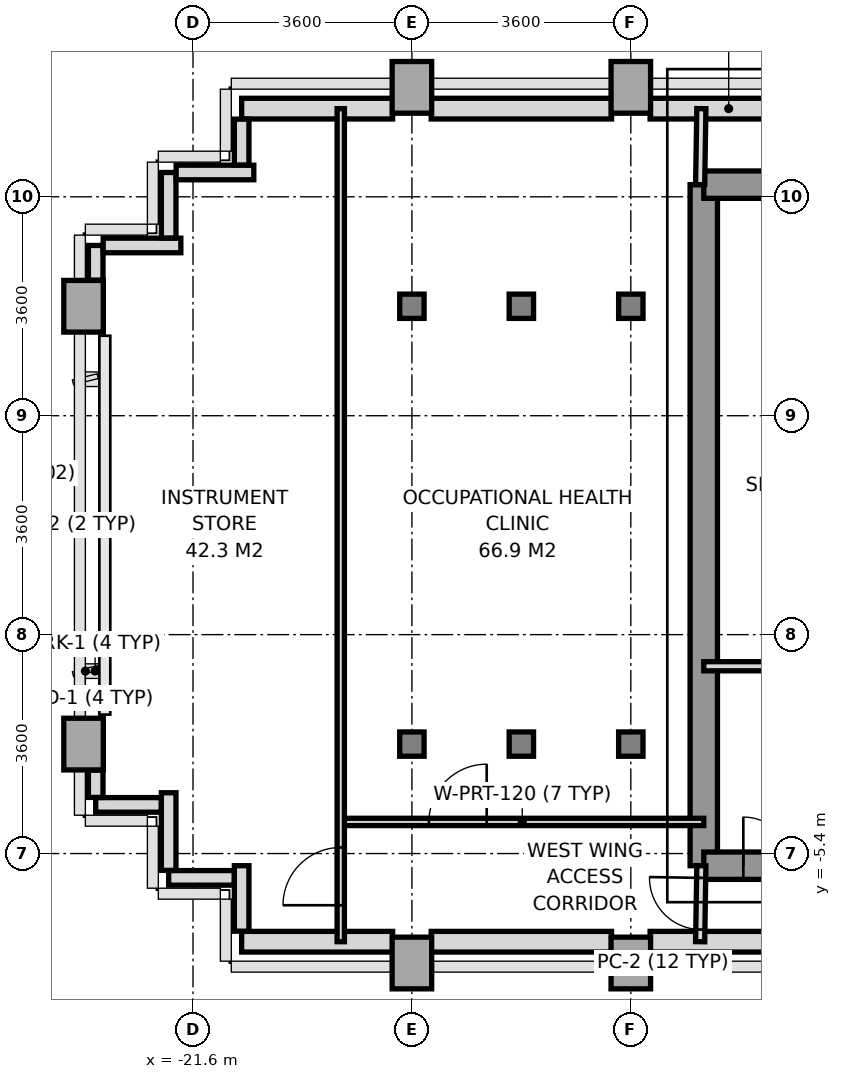
"""IFC4 building model, lengths in metres.
Left out: names, types, materials, properties, quantities, classifications, styles, units other than length and angle.
Written with IfcOpenShell. Run it as: python <this file> out.ifc"""

import sys

from ifc_helpers import new_model, si_unit, direction, frame, frame_2d, origin, origin_2d, place, context, subcontext, project, spatial, rectangle, i_section, extrude, source, transform, mapped, element, fill, save


model = new_model("IFC4")
c1 = context("Model", 3, precision=1e-05, world=origin(), true_north=direction((0.0, 1.0)))
c2 = subcontext(c1, "Body", "Model", "MODEL_VIEW")
j1 = project(units=[si_unit("LENGTHUNIT", "METRE"), si_unit("PLANEANGLEUNIT", "RADIAN")], contexts=[c1])
p1 = place(None, origin())
s1 = spatial("IfcSite", under=j1, at=p1, CompositionType="ELEMENT")
p2 = place(p1, origin())
s2 = spatial("IfcBuilding", under=s1, at=p2, CompositionType="ELEMENT")
p3 = place(p2, frame((0.0, 0.0, 148.2)))
s3 = spatial("IfcBuildingStorey", under=s2, at=p3, CompositionType="ELEMENT", Elevation=148.2)
m1 = source(origin(), c2, "Body", "SweptSolid", [
    extrude(rectangle(XDim=0.65, YDim=0.85, at=origin_2d()), origin(), (0.0, 0.0, 1.0), 3.14),
])
for number, where, z_axis, x_axis in (
    (1, (-23.4, -3.6, 0.0), (0.0, 0.0, 1.0), (1.0, 0.0, 0.0)),
    (2, (-23.4, 3.6, 0.0), (0.0, 0.0, 1.0), (1.0, 0.0, 0.0)),
    (3, (-18.0, -7.2, 0.0), (0.0, 0.0, 1.0), (1.0, 0.0, 0.0)),
):
    element("IfcColumn", number, at=place(p3, frame(where, z_axis=z_axis, x_axis=x_axis)), inside=s3, PredefinedType="COLUMN", context=c2, shape_type="MappedRepresentation", body=[
        mapped(m1, transform((0.0, 0.0, 0.0), x_axis=(1.0, 0.0, 0.0), y_axis=(0.0, 1.0, 0.0), z_axis=(0.0, 0.0, 1.0), scale=1.0)),
    ])
m2 = source(origin(), c2, "Body", "SweptSolid", [
    extrude(i_section(OverallWidth=0.401, OverallDepth=0.399, WebThickness=0.02, FlangeThickness=0.032, at=origin_2d()), origin(), (0.0, 0.0, 1.0), 3.14),
])
for number, where, z_axis, x_axis in (
    (4, (-18.0, -3.6, 0.0), (0.0, 0.0, 1.0), (1.0, 0.0, 0.0)),
    (5, (-18.0, 3.6, 0.0), (0.0, 0.0, 1.0), (1.0, 0.0, 0.0)),
):
    element("IfcColumn", number, at=place(p3, frame(where, z_axis=z_axis, x_axis=x_axis)), inside=s3, PredefinedType="COLUMN", context=c2, shape_type="MappedRepresentation", body=[
        mapped(m2, transform((0.0, 0.0, 0.0), x_axis=(1.0, 0.0, 0.0), y_axis=(0.0, 1.0, 0.0), z_axis=(0.0, 0.0, 1.0), scale=1.0)),
    ])
p4 = place(p3, frame((-18.0, 7.2, 0.0), z_axis=(0.0, 0.0, 1.0), x_axis=(1.0, 0.0, 0.0)))
e6 = element("IfcColumn", 6, at=p4, inside=s3, PredefinedType="COLUMN", context=c2, shape_type="MappedRepresentation", body=[
    mapped(m1, transform((0.0, 0.0, 0.0), x_axis=(1.0, 0.0, 0.0), y_axis=(0.0, 1.0, 0.0), z_axis=(0.0, 0.0, 1.0), scale=1.0)),
])
for number, where, z_axis, x_axis in (
    (7, (-16.2, -3.6, 0.0), (0.0, 0.0, 1.0), (1.0, 0.0, 0.0)),
    (8, (-16.2, 3.6, 0.0), (0.0, 0.0, 1.0), (1.0, 0.0, 0.0)),
):
    element("IfcColumn", number, at=place(p3, frame(where, z_axis=z_axis, x_axis=x_axis)), inside=s3, PredefinedType="COLUMN", context=c2, shape_type="MappedRepresentation", body=[
        mapped(m2, transform((0.0, 0.0, 0.0), x_axis=(1.0, 0.0, 0.0), y_axis=(0.0, 1.0, 0.0), z_axis=(0.0, 0.0, 1.0), scale=1.0)),
    ])
p5 = place(p3, frame((-14.4, -7.2, 0.0), z_axis=(0.0, 0.0, 1.0), x_axis=(1.0, 0.0, 0.0)))
e9 = element("IfcColumn", 9, at=p5, inside=s3, PredefinedType="COLUMN", context=c2, shape_type="MappedRepresentation", body=[
    mapped(m1, transform((0.0, 0.0, 0.0), x_axis=(1.0, 0.0, 0.0), y_axis=(0.0, 1.0, 0.0), z_axis=(0.0, 0.0, 1.0), scale=1.0)),
])
for number, where, z_axis, x_axis in (
    (10, (-14.4, -3.6, 0.0), (0.0, 0.0, 1.0), (1.0, 0.0, 0.0)),
    (11, (-14.4, 3.6, 0.0), (0.0, 0.0, 1.0), (1.0, 0.0, 0.0)),
):
    element("IfcColumn", number, at=place(p3, frame(where, z_axis=z_axis, x_axis=x_axis)), inside=s3, PredefinedType="COLUMN", context=c2, shape_type="MappedRepresentation", body=[
        mapped(m2, transform((0.0, 0.0, 0.0), x_axis=(1.0, 0.0, 0.0), y_axis=(0.0, 1.0, 0.0), z_axis=(0.0, 0.0, 1.0), scale=1.0)),
    ])
p6 = place(p3, frame((-14.4, 7.2, 0.0), z_axis=(0.0, 0.0, 1.0), x_axis=(1.0, 0.0, 0.0)))
e12 = element("IfcColumn", 12, at=p6, inside=s3, PredefinedType="COLUMN", context=c2, shape_type="MappedRepresentation", body=[
    mapped(m1, transform((0.0, 0.0, 0.0), x_axis=(1.0, 0.0, 0.0), y_axis=(0.0, 1.0, 0.0), z_axis=(0.0, 0.0, 1.0), scale=1.0)),
])
p7 = place(p3, frame((-20.8, 6.85, 0.0), z_axis=(0.0, 0.0, 1.0), x_axis=(1.0, 0.0, 0.0)))
e13 = element("IfcWall", 13, at=p7, inside=s3, PredefinedType="SOLIDWALL", context=c2, shape_type="SweptSolid", body=[
    extrude(rectangle(XDim=2.483, YDim=0.34, at=frame_2d((1.242, 0.0))), origin(), (0.0, 0.0, 1.0), 3.14),
])
p8 = place(p3, frame((-17.683, 6.85, 0.0), z_axis=(0.0, 0.0, 1.0), x_axis=(1.0, 0.0, 0.0)))
e14 = element("IfcWall", 14, at=p8, inside=s3, PredefinedType="SOLIDWALL", context=c2, shape_type="SweptSolid", body=[
    extrude(rectangle(XDim=2.966, YDim=0.34, at=frame_2d((1.483, 0.0))), origin(), (0.0, 0.0, 1.0), 2.39),
])
p9 = place(p3, frame((-14.083, 6.85, 0.0), z_axis=(0.0, 0.0, 1.0), x_axis=(1.0, 0.0, 0.0)))
e15 = element("IfcWall", 15, at=p9, inside=s3, PredefinedType="SOLIDWALL", context=c2, shape_type="SweptSolid", body=[
    extrude(rectangle(XDim=2.585, YDim=0.34, at=frame_2d((1.292, 0.0))), origin(), (0.0, 0.0, 1.0), 3.14),
])
p10 = place(p3, frame((-20.8, -6.85, 0.0), z_axis=(0.0, 0.0, 1.0), x_axis=(1.0, 0.0, 0.0)))
e16 = element("IfcWall", 16, at=p10, inside=s3, PredefinedType="SOLIDWALL", context=c2, shape_type="SweptSolid", body=[
    extrude(rectangle(XDim=2.483, YDim=0.34, at=frame_2d((1.242, 0.0))), origin(), (0.0, 0.0, 1.0), 3.14),
])
p11 = place(p3, frame((-17.683, -6.85, 0.0), z_axis=(0.0, 0.0, 1.0), x_axis=(1.0, 0.0, 0.0)))
e17 = element("IfcWall", 17, at=p11, inside=s3, PredefinedType="SOLIDWALL", context=c2, shape_type="SweptSolid", body=[
    extrude(rectangle(XDim=2.966, YDim=0.34, at=frame_2d((1.483, 0.0))), origin(), (0.0, 0.0, 1.0), 2.39),
])
p12 = place(p3, frame((-14.083, -6.85, 0.0), z_axis=(0.0, 0.0, 1.0), x_axis=(1.0, 0.0, 0.0)))
e18 = element("IfcWall", 18, at=p12, inside=s3, PredefinedType="SOLIDWALL", context=c2, shape_type="SweptSolid", body=[
    extrude(rectangle(XDim=2.333, YDim=0.34, at=frame_2d((1.167, 0.0))), origin(), (0.0, 0.0, 1.0), 3.14),
])
for number, where, z_axis, x_axis in (
    (19, (-20.8, -6.677, 0.0), (0.0, 0.0, 1.0), (0.0, 1.0, 0.0)),
    (20, (-20.923, -5.8, 0.0), (0.0, 0.0, 1.0), (-1.0, 0.0, 0.0)),
):
    element("IfcWall", number, at=place(p3, frame(where, z_axis=z_axis, x_axis=x_axis)), inside=s3, PredefinedType="PARAPET", context=c2, shape_type="SweptSolid", body=[
        extrude(rectangle(XDim=1.077, YDim=0.24, at=frame_2d((0.539, 0.0))), origin(), (0.0, 0.0, 1.0), 1.15),
    ])
p13 = place(p3, frame((-22.0, -5.677, 0.0), z_axis=(0.0, 0.0, 1.0), x_axis=(0.0, 1.0, 0.0)))
e21 = element("IfcWall", 21, at=p13, inside=s3, PredefinedType="PARAPET", context=c2, shape_type="SweptSolid", body=[
    extrude(rectangle(XDim=1.277, YDim=0.24, at=frame_2d((0.639, 0.0))), origin(), (0.0, 0.0, 1.0), 1.15),
])
p14 = place(p3, frame((-22.123, -4.6, 0.0), z_axis=(0.0, 0.0, 1.0), x_axis=(-1.0, 0.0, 0.0)))
e22 = element("IfcWall", 22, at=p14, inside=s3, PredefinedType="PARAPET", context=c2, shape_type="SweptSolid", body=[
    extrude(rectangle(XDim=1.077, YDim=0.24, at=frame_2d((0.539, 0.0))), origin(), (0.0, 0.0, 1.0), 1.15),
])
p15 = place(p3, frame((-23.2, -4.477, 0.0), z_axis=(0.0, 0.0, 1.0), x_axis=(0.0, 1.0, 0.0)))
e23 = element("IfcWall", 23, at=p15, inside=s3, PredefinedType="PARAPET", context=c2, shape_type="SweptSolid", body=[
    extrude(rectangle(XDim=0.449, YDim=0.24, at=frame_2d((0.225, 0.0))), origin(), (0.0, 0.0, 1.0), 1.15),
])
p16 = place(p3, frame((-23.2, 4.028, 0.0), z_axis=(0.0, 0.0, 1.0), x_axis=(0.0, 1.0, 0.0)))
e24 = element("IfcWall", 24, at=p16, inside=s3, PredefinedType="PARAPET", context=c2, shape_type="SweptSolid", body=[
    extrude(rectangle(XDim=0.572, YDim=0.24, at=frame_2d((0.286, 0.0))), origin(), (0.0, 0.0, 1.0), 1.15),
])
p17 = place(p3, frame((-23.077, 4.6, 0.0), z_axis=(0.0, 0.0, 1.0), x_axis=(1.0, 0.0, 0.0)))
e25 = element("IfcWall", 25, at=p17, inside=s3, PredefinedType="PARAPET", context=c2, shape_type="SweptSolid", body=[
    extrude(rectangle(XDim=1.277, YDim=0.24, at=frame_2d((0.638, 0.0))), origin(), (0.0, 0.0, 1.0), 1.15),
])
p18 = place(p3, frame((-22.0, 4.723, 0.0), z_axis=(0.0, 0.0, 1.0), x_axis=(0.0, 1.0, 0.0)))
e26 = element("IfcWall", 26, at=p18, inside=s3, PredefinedType="PARAPET", context=c2, shape_type="SweptSolid", body=[
    extrude(rectangle(XDim=1.077, YDim=0.24, at=frame_2d((0.539, 0.0))), origin(), (0.0, 0.0, 1.0), 1.15),
])
p19 = place(p3, frame((-21.877, 5.8, 0.0), z_axis=(0.0, 0.0, 1.0), x_axis=(1.0, 0.0, 0.0)))
e27 = element("IfcWall", 27, at=p19, inside=s3, PredefinedType="PARAPET", context=c2, shape_type="SweptSolid", body=[
    extrude(rectangle(XDim=1.277, YDim=0.24, at=frame_2d((0.638, 0.0))), origin(), (0.0, 0.0, 1.0), 1.15),
])
p20 = place(p3, frame((-20.8, 5.923, 0.0), z_axis=(0.0, 0.0, 1.0), x_axis=(0.0, 1.0, 0.0)))
e28 = element("IfcWall", 28, at=p20, inside=s3, PredefinedType="PARAPET", context=c2, shape_type="SweptSolid", body=[
    extrude(rectangle(XDim=0.754, YDim=0.24, at=frame_2d((0.377, 0.0))), origin(), (0.0, 0.0, 1.0), 1.15),
])
p21 = place(p3, frame((-13.2, -5.6, 0.0), z_axis=(0.0, 0.0, 1.0), x_axis=(0.0, 1.0, 0.0)))
e29 = element("IfcWall", 29, at=p21, inside=s3, PredefinedType="SHEAR", context=c2, shape_type="SweptSolid", body=[
    extrude(rectangle(XDim=11.2, YDim=0.45, at=frame_2d((5.6, 0.0))), origin(), (0.0, 0.0, 1.0), 3.14),
])
p22 = place(p3, frame((-13.2, 5.6, 0.0), z_axis=(0.0, 0.0, 1.0), x_axis=(1.0, 0.0, 0.0)))
e30 = element("IfcWall", 30, at=p22, inside=s3, PredefinedType="SHEAR", context=c2, shape_type="SweptSolid", body=[
    extrude(rectangle(XDim=1.819, YDim=0.45, at=frame_2d((0.909, 0.0))), origin(), (0.0, 0.0, 1.0), 3.14),
])
p23 = place(p3, frame((-13.2, -5.6, 0.0), z_axis=(0.0, 0.0, 1.0), x_axis=(1.0, 0.0, 0.0)))
e31 = element("IfcWall", 31, at=p23, inside=s3, PredefinedType="SHEAR", context=c2, shape_type="SweptSolid", body=[
    extrude(rectangle(XDim=7.8, YDim=0.45, at=frame_2d((3.9, 0.0))), origin(), (0.0, 0.0, 1.0), 3.14),
])
p24 = place(p23, frame((3.6, 0.0, 0.0)))
e32 = element("IfcOpeningElement", 32, at=p24, cuts=e31, PredefinedType="OPENING", context=c2, shape_type="SweptSolid", body=[
    extrude(rectangle(XDim=1.2, YDim=2.2, at=frame_2d((0.6, 1.1))), frame((0.0, 0.235, 0.0), z_axis=(0.0, -1.0, 0.0), x_axis=(1.0, 0.0, 0.0)), (0.0, 0.0, 1.0), 0.47),
])
p25 = place(p23, frame((0.65, 0.0, 0.0)))
e33 = element("IfcOpeningElement", 33, at=p25, cuts=e31, PredefinedType="OPENING", context=c2, shape_type="SweptSolid", body=[
    extrude(rectangle(XDim=0.8, YDim=2.1, at=frame_2d((0.4, 1.05))), frame((0.0, 0.235, 0.0), z_axis=(0.0, -1.0, 0.0), x_axis=(1.0, 0.0, 0.0)), (0.0, 0.0, 1.0), 0.47),
])
p26 = place(p3, frame((-13.2, -2.32, 0.0), z_axis=(0.0, 0.0, 1.0), x_axis=(1.0, 0.0, 0.0)))
e34 = element("IfcWall", 34, at=p26, inside=s3, PredefinedType="PARTITIONING", context=c2, shape_type="SweptSolid", body=[
    extrude(rectangle(XDim=2.18, YDim=0.15, at=frame_2d((1.09, 0.0))), origin(), (0.0, 0.0, 1.0), 3.14),
])
p27 = place(p3, frame((-13.26, 5.6, 0.0), z_axis=(0.0, 0.0, 1.0), x_axis=(0.016013571389, 0.999871774545, 0.0)))
e35 = element("IfcWall", 35, at=p27, inside=s3, PredefinedType="PARTITIONING", context=c2, shape_type="SweptSolid", body=[
    extrude(rectangle(XDim=1.25, YDim=0.15, at=frame_2d((0.625, 0.0))), origin(), (0.0, 0.0, 1.0), 3.14),
])
p28 = place(p3, frame((-13.26, -6.85, 0.0), z_axis=(0.0, 0.0, 1.0), x_axis=(0.016013571389, 0.999871774545, 0.0)))
e36 = element("IfcWall", 36, at=p28, inside=s3, PredefinedType="PARTITIONING", context=c2, shape_type="SweptSolid", body=[
    extrude(rectangle(XDim=1.25, YDim=0.15, at=frame_2d((0.625, 0.0))), origin(), (0.0, 0.0, 1.0), 3.14),
])
p29 = place(p28, frame((0.2, 0.0, 0.0)))
e37 = element("IfcOpeningElement", 37, at=p29, cuts=e36, PredefinedType="OPENING", context=c2, shape_type="SweptSolid", body=[
    extrude(rectangle(XDim=0.85, YDim=2.1, at=frame_2d((0.425, 1.05))), frame((0.0, 0.085, 0.0), z_axis=(0.0, -1.0, 0.0), x_axis=(1.0, 0.0, 0.0)), (0.0, 0.0, 1.0), 0.17),
])
p30 = place(p3, frame((-19.17, -4.88, 0.0), z_axis=(0.0, 0.0, 1.0), x_axis=(1.0, 0.0, 0.0)))
e38 = element("IfcWall", 38, at=p30, inside=s3, PredefinedType="PARTITIONING", context=c2, shape_type="SweptSolid", body=[
    extrude(rectangle(XDim=5.97, YDim=0.12, at=frame_2d((2.985, 0.0))), origin(), (0.0, 0.0, 1.0), 2.69),
])
p31 = place(p30, frame((1.45, 0.0, 0.0)))
e39 = element("IfcOpeningElement", 39, at=p31, cuts=e38, PredefinedType="OPENING", context=c2, shape_type="SweptSolid", body=[
    extrude(rectangle(XDim=0.95, YDim=2.15, at=frame_2d((0.475, 1.075))), frame((0.0, 0.07, 0.0), z_axis=(0.0, -1.0, 0.0), x_axis=(1.0, 0.0, 0.0)), (0.0, 0.0, 1.0), 0.14),
])
p32 = place(p3, frame((-19.17, -6.85, 0.0), z_axis=(0.0, 0.0, 1.0), x_axis=(0.0, 1.0, 0.0)))
e40 = element("IfcWall", 40, at=p32, inside=s3, PredefinedType="PARTITIONING", context=c2, shape_type="SweptSolid", body=[
    extrude(rectangle(XDim=13.7, YDim=0.12, at=frame_2d((6.85, 0.0))), origin(), (0.0, 0.0, 1.0), 2.64),
])
p33 = place(p32, frame((0.6, 0.0, 0.0)))
e41 = element("IfcOpeningElement", 41, at=p33, cuts=e40, PredefinedType="OPENING", context=c2, shape_type="SweptSolid", body=[
    extrude(rectangle(XDim=0.95, YDim=2.15, at=frame_2d((0.475, 1.075))), frame((0.0, 0.07, 0.0), z_axis=(0.0, -1.0, 0.0), x_axis=(1.0, 0.0, 0.0)), (0.0, 0.0, 1.0), 0.14),
])
m3 = source(origin(), c2, "Body", "SweptSolid", [
    extrude(rectangle(XDim=0.8, YDim=2.1, at=frame_2d((0.4, 1.05))), frame((0.0, 0.025, 0.0), z_axis=(0.0, -1.0, 0.0), x_axis=(1.0, 0.0, 0.0)), (0.0, 0.0, 1.0), 0.05),
])
p34 = place(p25, origin())
e42 = element("IfcDoor", 42, at=p34, inside=s3, OperationType="SINGLE_SWING_LEFT", PredefinedType="DOOR", context=c2, shape_type="MappedRepresentation", body=[
    mapped(m3, transform((0.0, 0.0, 0.0), x_axis=(1.0, 0.0, 0.0), y_axis=(0.0, 1.0, 0.0), z_axis=(0.0, 0.0, 1.0), scale=1.0)),
])
fill(e33, e42)
m4 = source(origin(), c2, "Body", "SweptSolid", [
    extrude(rectangle(XDim=0.95, YDim=2.15, at=frame_2d((0.475, 1.075))), frame((0.0, 0.025, 0.0), z_axis=(0.0, -1.0, 0.0), x_axis=(1.0, 0.0, 0.0)), (0.0, 0.0, 1.0), 0.05),
])
p35 = place(p31, origin())
e43 = element("IfcDoor", 43, at=p35, inside=s3, OperationType="SINGLE_SWING_RIGHT", PredefinedType="DOOR", context=c2, shape_type="MappedRepresentation", body=[
    mapped(m4, transform((0.0, 0.0, 0.0), x_axis=(1.0, 0.0, 0.0), y_axis=(0.0, 1.0, 0.0), z_axis=(0.0, 0.0, 1.0), scale=1.0)),
])
fill(e39, e43)
p36 = place(p33, origin())
e44 = element("IfcDoor", 44, at=p36, inside=s3, OperationType="SINGLE_SWING_LEFT", PredefinedType="DOOR", context=c2, shape_type="MappedRepresentation", body=[
    mapped(m4, transform((0.0, 0.0, 0.0), x_axis=(1.0, 0.0, 0.0), y_axis=(0.0, 1.0, 0.0), z_axis=(0.0, 0.0, 1.0), scale=1.0)),
])
fill(e41, e44)
m5 = source(origin(), c2, "Body", "SweptSolid", [
    extrude(rectangle(XDim=0.85, YDim=2.1, at=frame_2d((0.425, 1.05))), frame((0.0, 0.025, 0.0), z_axis=(0.0, -1.0, 0.0), x_axis=(1.0, 0.0, 0.0)), (0.0, 0.0, 1.0), 0.05),
])
p37 = place(p29, origin())
e45 = element("IfcDoor", 45, at=p37, inside=s3, OperationType="SINGLE_SWING_RIGHT", PredefinedType="DOOR", context=c2, shape_type="MappedRepresentation", body=[
    mapped(m5, transform((0.0, 0.0, 0.0), x_axis=(1.0, 0.0, 0.0), y_axis=(0.0, 1.0, 0.0), z_axis=(0.0, 0.0, 1.0), scale=1.0)),
])
fill(e37, e45)
save(model, sys.argv[1])
